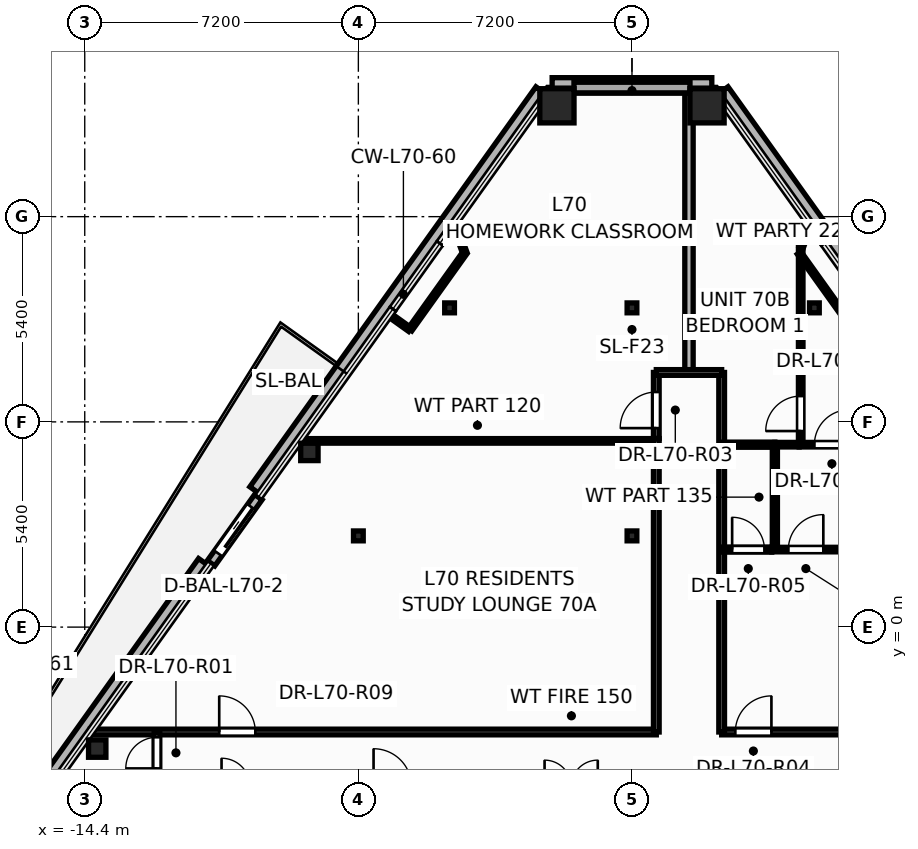
"""IFC4 building model, lengths in metres.
Left out: names, types, materials, properties, quantities, classifications, styles, units other than length and angle.
Written with IfcOpenShell. Run it as: python <this file> out.ifc"""

import sys

from ifc_helpers import new_model, si_unit, direction, frame, frame_2d, origin, origin_2d, place, context, subcontext, project, spatial, rectangle, hollow_rectangle, hollow_circle, i_section, extrude, element, fill, save


model = new_model("IFC4")
c1 = context("Model", 3, precision=1e-05, world=origin(), true_north=direction((0.0, 1.0)))
c2 = subcontext(c1, "Body", "Model", "MODEL_VIEW")
j1 = project(units=[si_unit("LENGTHUNIT", "METRE"), si_unit("PLANEANGLEUNIT", "RADIAN")], contexts=[c1])
p1 = place(None, origin())
s1 = spatial("IfcSite", under=j1, at=p1, CompositionType="ELEMENT")
p2 = place(p1, origin())
s2 = spatial("IfcBuilding", under=s1, at=p2, CompositionType="ELEMENT")
p3 = place(p2, frame((0.0, 0.0, 267.0)))
s3 = spatial("IfcBuildingStorey", under=s2, at=p3, CompositionType="ELEMENT", Elevation=267.0)
for number, where, z_axis, x_axis in (
    (1, (1.975, 13.717, 0.0), (0.0, 0.0, 1.0), (1.0, 0.0, 0.0)),
    (2, (-1.975, 13.717, 0.0), (0.0, 0.0, 1.0), (1.0, 0.0, 0.0)),
):
    element("IfcColumn", number, at=place(p3, frame(where, z_axis=z_axis, x_axis=x_axis)), inside=s3, PredefinedType="COLUMN", context=c2, shape_type="SweptSolid", body=[
        extrude(hollow_rectangle(XDim=0.9, YDim=0.9, WallThickness=0.04, at=origin_2d()), origin(), (0.0, 0.0, 1.0), 3.6),
    ])
for number, where, z_axis, x_axis in (
    (3, (-8.489, 4.61, 0.0), (0.0, 0.0, 1.0), (1.0, 0.0, 0.0)),
    (4, (-14.072, -3.196, 0.0), (0.0, 0.0, 1.0), (1.0, 0.0, 0.0)),
):
    element("IfcColumn", number, at=place(p3, frame(where, z_axis=z_axis, x_axis=x_axis)), inside=s3, PredefinedType="COLUMN", context=c2, shape_type="SweptSolid", body=[
        extrude(hollow_circle(Radius=0.229, WallThickness=0.016, at=origin_2d()), origin(), (0.0, 0.0, 1.0), 3.6),
    ])
for number, where, z_axis, x_axis in (
    (5, (-7.2, 2.4, 0.0), (0.0, 0.0, 1.0), (1.0, 0.0, 0.0)),
    (6, (0.0, 2.4, 0.0), (0.0, 0.0, 1.0), (1.0, 0.0, 0.0)),
    (7, (-4.8, 8.4, 0.0), (0.0, 0.0, 1.0), (1.0, 0.0, 0.0)),
    (8, (0.0, 8.4, 0.0), (0.0, 0.0, 1.0), (1.0, 0.0, 0.0)),
    (9, (4.8, 8.4, 0.0), (0.0, 0.0, 1.0), (1.0, 0.0, 0.0)),
):
    element("IfcColumn", number, at=place(p3, frame(where, z_axis=z_axis, x_axis=x_axis)), inside=s3, PredefinedType="COLUMN", context=c2, shape_type="SweptSolid", body=[
        extrude(i_section(OverallWidth=0.256, OverallDepth=0.26, WebThickness=0.01, FlangeThickness=0.017, at=origin_2d()), origin(), (0.0, 0.0, 1.0), 3.6),
    ])
p4 = place(p3, frame((12.042, 0.604, -0.2), z_axis=(0.0, 0.0, 1.0), x_axis=(-0.581727587341, 0.813383681989, 0.0)))
e10 = element("IfcWall", 10, at=p4, inside=s3, PredefinedType="PARAPET", context=c2, shape_type="SweptSolid", body=[
    extrude(rectangle(XDim=16.607, YDim=0.36, at=frame_2d((8.304, 0.0))), origin(), (0.0, 0.0, 1.0), 0.38),
])
p5 = place(p3, frame((2.101, 14.277, -0.2), z_axis=(0.0, 0.0, 1.0), x_axis=(-1.0, 0.0, 0.0)))
e11 = element("IfcWall", 11, at=p5, inside=s3, PredefinedType="PARAPET", context=c2, shape_type="SweptSolid", body=[
    extrude(rectangle(XDim=4.202, YDim=0.36, at=frame_2d((2.101, 0.0))), origin(), (0.0, 0.0, 1.0), 0.38),
])
p6 = place(p3, frame((-2.381, 14.112, -0.2), z_axis=(0.0, 0.0, 1.0), x_axis=(-0.581734227536, -0.813378932917, 0.0)))
e12 = element("IfcWall", 12, at=p6, inside=s3, PredefinedType="PARAPET", context=c2, shape_type="SweptSolid", body=[
    extrude(rectangle(XDim=12.94, YDim=0.36, at=frame_2d((6.47, 0.0))), origin(), (0.0, 0.0, 1.0), 0.38),
])
p7 = place(p3, frame((-11.258, 1.7, -0.2), z_axis=(0.0, 0.0, 1.0), x_axis=(-0.581729036712, -0.813382645405, 0.0)))
e13 = element("IfcWall", 13, at=p7, inside=s3, PredefinedType="PARAPET", context=c2, shape_type="SweptSolid", body=[
    extrude(rectangle(XDim=16.981, YDim=0.36, at=frame_2d((8.491, 0.0))), origin(), (0.0, 0.0, 1.0), 0.38),
])
p8 = place(p3, frame((-9.831, 3.42, -0.015), z_axis=(0.0, 0.0, 1.0), x_axis=(-0.581756116184, -0.81336327756, 0.0)))
e14 = element("IfcWall", 14, at=p8, inside=s3, PredefinedType="STANDARD", context=c2, shape_type="SweptSolid", body=[
    extrude(rectangle(XDim=2.14, YDim=0.24, at=frame_2d((1.07, 0.0))), origin(), (0.0, 0.0, 1.0), 2.878),
])
p9 = place(p8, frame((0.32, 0.0, 0.015)))
e15 = element("IfcOpeningElement", 15, at=p9, cuts=e14, PredefinedType="OPENING", context=c2, shape_type="SweptSolid", body=[
    extrude(rectangle(XDim=1.506, YDim=2.204, at=frame_2d((0.75, 1.102))), frame((0.0, 0.13, 0.0), z_axis=(0.0, -1.0, 0.0), x_axis=(1.0, 0.0, 0.0)), (0.0, 0.0, 1.0), 0.26),
])
p10 = place(p3, frame((-14.251, -2.76, 0.0), z_axis=(0.0, 0.0, 1.0), x_axis=(1.0, 0.0, 0.0)))
e16 = element("IfcWall", 16, at=p10, inside=s3, PredefinedType="PARTITIONING", context=c2, shape_type="SweptSolid", body=[
    extrude(rectangle(XDim=14.891, YDim=0.15, at=frame_2d((7.446, 0.0))), origin(), (0.0, 0.0, 1.0), 2.32),
])
p11 = place(p10, frame((3.39, 0.0, 0.0)))
e17 = element("IfcOpeningElement", 17, at=p11, cuts=e16, PredefinedType="OPENING", context=c2, shape_type="SweptSolid", body=[
    extrude(rectangle(XDim=0.956, YDim=2.104, at=frame_2d((0.475, 1.052))), frame((0.0, 0.085, 0.0), z_axis=(0.0, -1.0, 0.0), x_axis=(1.0, 0.0, 0.0)), (0.0, 0.0, 1.0), 0.17),
])
p12 = place(p3, frame((-8.773, 4.9, 0.0), z_axis=(0.0, 0.0, 1.0), x_axis=(1.0, 0.0, 0.0)))
e18 = element("IfcWall", 18, at=p12, inside=s3, PredefinedType="PARTITIONING", context=c2, shape_type="SweptSolid", body=[
    extrude(rectangle(XDim=9.413, YDim=0.12, at=frame_2d((4.706, 0.0))), origin(), (0.0, 0.0, 1.0), 2.32),
])
p13 = place(p3, frame((0.64, -2.76, 0.0), z_axis=(0.0, 0.0, 1.0), x_axis=(0.0, 1.0, 0.0)))
e19 = element("IfcWall", 19, at=p13, inside=s3, PredefinedType="PARTITIONING", context=c2, shape_type="SweptSolid", body=[
    extrude(rectangle(XDim=7.72, YDim=0.15, at=frame_2d((3.86, 0.0))), origin(), (0.0, 0.0, 1.0), 2.32),
])
p14 = place(p3, frame((1.5, 6.7, 0.0), z_axis=(0.0, 0.0, 1.0), x_axis=(0.0, 1.0, 0.0)))
e20 = element("IfcWall", 20, at=p14, inside=s3, PredefinedType="PARTITIONING", context=c2, shape_type="SweptSolid", body=[
    extrude(rectangle(XDim=7.417, YDim=0.22, at=frame_2d((3.708, 0.0))), origin(), (0.0, 0.0, 1.0), 2.718),
])
p15 = place(p3, frame((4.44, 4.8, 0.0), z_axis=(0.0, 0.0, 1.0), x_axis=(0.0, 1.0, 0.0)))
e21 = element("IfcWall", 21, at=p15, inside=s3, PredefinedType="PARTITIONING", context=c2, shape_type="SweptSolid", body=[
    extrude(rectangle(XDim=5.2, YDim=0.12, at=frame_2d((2.6, 0.0))), origin(), (0.0, 0.0, 1.0), 2.718),
])
p16 = place(p15, frame((0.359, 0.0, 0.0)))
e22 = element("IfcOpeningElement", 22, at=p16, cuts=e21, PredefinedType="OPENING", context=c2, shape_type="SweptSolid", body=[
    extrude(rectangle(XDim=0.926, YDim=2.104, at=frame_2d((0.46, 1.052))), frame((0.0, 0.07, 0.0), z_axis=(0.0, -1.0, 0.0), x_axis=(1.0, 0.0, 0.0)), (0.0, 0.0, 1.0), 0.14),
])
p17 = place(p3, frame((2.36, -2.76, 0.0), z_axis=(0.0, 0.0, 1.0), x_axis=(1.0, 0.0, 0.0)))
e23 = element("IfcWall", 23, at=p17, inside=s3, PredefinedType="PARTITIONING", context=c2, shape_type="SweptSolid", body=[
    extrude(rectangle(XDim=4.978, YDim=0.15, at=frame_2d((2.489, 0.0))), origin(), (0.0, 0.0, 1.0), 2.32),
])
p18 = place(p17, frame((0.359, 0.0, 0.0)))
e24 = element("IfcOpeningElement", 24, at=p18, cuts=e23, PredefinedType="OPENING", context=c2, shape_type="SweptSolid", body=[
    extrude(rectangle(XDim=0.956, YDim=2.104, at=frame_2d((0.475, 1.052))), frame((0.0, 0.085, 0.0), z_axis=(0.0, -1.0, 0.0), x_axis=(1.0, 0.0, 0.0)), (0.0, 0.0, 1.0), 0.17),
])
p19 = place(p3, frame((2.36, -2.76, 0.0), z_axis=(0.0, 0.0, 1.0), x_axis=(0.0, 1.0, 0.0)))
e25 = element("IfcWall", 25, at=p19, inside=s3, PredefinedType="PARTITIONING", context=c2, shape_type="SweptSolid", body=[
    extrude(rectangle(XDim=9.46, YDim=0.15, at=frame_2d((4.73, 0.0))), origin(), (0.0, 0.0, 1.0), 2.32),
])
p20 = place(p3, frame((4.4, 4.8, 0.0), z_axis=(0.0, 0.0, 1.0), x_axis=(1.0, 0.0, 0.0)))
e26 = element("IfcWall", 26, at=p20, inside=s3, PredefinedType="PARTITIONING", context=c2, shape_type="SweptSolid", body=[
    extrude(rectangle(XDim=4.444, YDim=0.12, at=frame_2d((2.222, 0.0))), origin(), (0.0, 0.0, 1.0), 2.718),
])
p21 = place(p20, frame((0.4, 0.0, 0.0)))
e27 = element("IfcOpeningElement", 27, at=p21, cuts=e26, PredefinedType="OPENING", context=c2, shape_type="SweptSolid", body=[
    extrude(rectangle(XDim=0.926, YDim=2.104, at=frame_2d((0.46, 1.052))), frame((0.0, 0.07, 0.0), z_axis=(0.0, -1.0, 0.0), x_axis=(1.0, 0.0, 0.0)), (0.0, 0.0, 1.0), 0.14),
])
p22 = place(p3, frame((3.68, 2.04, 0.0), z_axis=(0.0, 0.0, 1.0), x_axis=(1.0, 0.0, 0.0)))
e28 = element("IfcWall", 28, at=p22, inside=s3, PredefinedType="PARTITIONING", context=c2, shape_type="SweptSolid", body=[
    extrude(rectangle(XDim=3.72, YDim=0.12, at=frame_2d((1.86, 0.0))), origin(), (0.0, 0.0, 1.0), 2.32),
])
p23 = place(p22, frame((0.435, 0.0, 0.0)))
e29 = element("IfcOpeningElement", 29, at=p23, cuts=e28, PredefinedType="OPENING", context=c2, shape_type="SweptSolid", body=[
    extrude(rectangle(XDim=0.926, YDim=2.104, at=frame_2d((0.46, 1.052))), frame((0.0, 0.07, 0.0), z_axis=(0.0, -1.0, 0.0), x_axis=(1.0, 0.0, 0.0)), (0.0, 0.0, 1.0), 0.14),
])
p24 = place(p3, frame((3.76, 2.04, 0.0), z_axis=(0.0, 0.0, 1.0), x_axis=(0.0, 1.0, 0.0)))
e30 = element("IfcWall", 30, at=p24, inside=s3, PredefinedType="PARTITIONING", context=c2, shape_type="SweptSolid", body=[
    extrude(rectangle(XDim=2.76, YDim=0.135, at=frame_2d((1.38, 0.0))), origin(), (0.0, 0.0, 1.0), 2.32),
])
for number, where, z_axis, x_axis in (
    (31, (-4.399, 9.846, 0.0), (0.0, 0.0, 1.0), (-0.582, -0.813, 0.0)),
    (32, (5.842, 7.829, 0.0), (0.0, 0.0, 1.0), (-0.582, 0.813, 0.0)),
):
    element("IfcWall", number, at=place(p3, frame(where, z_axis=z_axis, x_axis=x_axis)), inside=s3, PredefinedType="PARTITIONING", context=c2, shape_type="SweptSolid", body=[
        extrude(rectangle(XDim=2.48, YDim=0.12, at=frame_2d((1.24, 0.0))), origin(), (0.0, 0.0, 1.0), 3.345),
    ])
p25 = place(p3, frame((0.64, 4.962, 0.0), z_axis=(0.0, 0.0, 1.0), x_axis=(0.0, 1.0, 0.0)))
e33 = element("IfcWall", 33, at=p25, inside=s3, PredefinedType="PARTITIONING", context=c2, shape_type="SweptSolid", body=[
    extrude(rectangle(XDim=1.738, YDim=0.15, at=frame_2d((0.869, 0.0))), origin(), (0.0, 0.0, 1.0), 3.345),
])
p26 = place(p25, frame((0.274, 0.0, 0.0)))
e34 = element("IfcOpeningElement", 34, at=p26, cuts=e33, PredefinedType="OPENING", context=c2, shape_type="SweptSolid", body=[
    extrude(rectangle(XDim=0.956, YDim=2.104, at=frame_2d((0.475, 1.052))), frame((0.0, 0.085, 0.0), z_axis=(0.0, -1.0, 0.0), x_axis=(1.0, 0.0, 0.0)), (0.0, 0.0, 1.0), 0.17),
])
p27 = place(p3, frame((-12.5, -4.24, 0.0), z_axis=(0.0, 0.0, 1.0), x_axis=(0.0, 1.0, 0.0)))
e35 = element("IfcWall", 35, at=p27, inside=s3, PredefinedType="PARTITIONING", context=c2, shape_type="SweptSolid", body=[
    extrude(rectangle(XDim=1.48, YDim=0.15, at=frame_2d((0.74, 0.0))), origin(), (0.0, 0.0, 1.0), 2.32),
])
p28 = place(p27, frame((0.522, 0.0, 0.0)))
e36 = element("IfcOpeningElement", 36, at=p28, cuts=e35, PredefinedType="OPENING", context=c2, shape_type="SweptSolid", body=[
    extrude(rectangle(XDim=0.826, YDim=2.104, at=frame_2d((0.41, 1.052))), frame((0.0, 0.085, 0.0), z_axis=(0.0, -1.0, 0.0), x_axis=(1.0, 0.0, 0.0)), (0.0, 0.0, 1.0), 0.17),
])
p29 = place(p3, frame((2.36, 2.04, 0.0), z_axis=(0.0, 0.0, 1.0), x_axis=(1.0, 0.0, 0.0)))
e37 = element("IfcWall", 37, at=p29, inside=s3, PredefinedType="PARTITIONING", context=c2, shape_type="SweptSolid", body=[
    extrude(rectangle(XDim=1.318, YDim=0.135, at=frame_2d((0.659, 0.0))), origin(), (0.0, 0.0, 1.0), 2.964),
])
p30 = place(p29, frame((0.276, 0.0, 0.0)))
e38 = element("IfcOpeningElement", 38, at=p30, cuts=e37, PredefinedType="OPENING", context=c2, shape_type="SweptSolid", body=[
    extrude(rectangle(XDim=0.856, YDim=2.104, at=frame_2d((0.425, 1.052))), frame((0.0, 0.078, 0.0), z_axis=(0.0, -1.0, 0.0), x_axis=(1.0, 0.0, 0.0)), (0.0, 0.0, 1.0), 0.155),
])
p31 = place(p3, frame((2.36, 4.8, 0.0), z_axis=(0.0, 0.0, 1.0), x_axis=(1.0, 0.0, 0.0)))
e39 = element("IfcWall", 39, at=p31, inside=s3, PredefinedType="PARTITIONING", context=c2, shape_type="SweptSolid", body=[
    extrude(rectangle(XDim=1.4, YDim=0.135, at=frame_2d((0.7, 0.0))), origin(), (0.0, 0.0, 1.0), 2.964),
])
p32 = place(p3, frame((0.64, 6.7, 0.0), z_axis=(0.0, 0.0, 1.0), x_axis=(1.0, 0.0, 0.0)))
e40 = element("IfcWall", 40, at=p32, inside=s3, PredefinedType="PARTITIONING", context=c2, shape_type="SweptSolid", body=[
    extrude(rectangle(XDim=1.72, YDim=0.15, at=frame_2d((0.86, 0.0))), origin(), (0.0, 0.0, 1.0), 2.964),
])
p33 = place(p3, frame((-4.675, 10.612, 0.0), z_axis=(0.0, 0.0, 1.0), x_axis=(0.338177982942, -0.941082170617, 0.0)))
e41 = element("IfcWall", 41, at=p33, inside=s3, PredefinedType="PARTITIONING", context=c2, shape_type="SweptSolid", body=[
    extrude(rectangle(XDim=0.814, YDim=0.12, at=frame_2d((0.407, 0.0))), origin(), (0.0, 0.0, 1.0), 2.863),
])
p34 = place(p3, frame((4.455, 10.002, 0.0), z_axis=(0.0, 0.0, 1.0), x_axis=(0.338386229144, 0.941007311303, 0.0)))
e42 = element("IfcWall", 42, at=p34, inside=s3, PredefinedType="PARTITIONING", context=c2, shape_type="SweptSolid", body=[
    extrude(rectangle(XDim=0.649, YDim=0.12, at=frame_2d((0.324, 0.0))), origin(), (0.0, 0.0, 1.0), 2.863),
])
p35 = place(p3, frame((3.76, 4.8, 0.0), z_axis=(0.0, 0.0, 1.0), x_axis=(1.0, 0.0, 0.0)))
e43 = element("IfcWall", 43, at=p35, inside=s3, PredefinedType="PARTITIONING", context=c2, shape_type="SweptSolid", body=[
    extrude(rectangle(XDim=0.638, YDim=0.12, at=frame_2d((0.319, 0.0))), origin(), (0.0, 0.0, 1.0), 3.345),
])
p36 = place(p3, frame((-5.842, 7.829, 0.0), z_axis=(0.0, 0.0, 1.0), x_axis=(-0.813265440227, 0.581892879947, 0.0)))
e44 = element("IfcWall", 44, at=p36, inside=s3, PredefinedType="PARTITIONING", context=c2, shape_type="SweptSolid", body=[
    extrude(rectangle(XDim=0.67, YDim=0.12, at=frame_2d((0.335, 0.0))), origin(), (0.0, 0.0, 1.0), 2.863),
])
p37 = place(p9, origin())
e45 = element("IfcDoor", 45, at=p37, inside=s3, OperationType="SLIDING_TO_RIGHT", PredefinedType="DOOR", context=c2, shape_type="SweptSolid", body=[
    extrude(rectangle(XDim=1.5, YDim=2.2, at=frame_2d((0.75, 1.1))), frame((0.0, 0.025, 0.0), z_axis=(0.0, -1.0, 0.0), x_axis=(1.0, 0.0, 0.0)), (0.0, 0.0, 1.0), 0.05),
])
fill(e15, e45)
p38 = place(p28, origin())
e46 = element("IfcDoor", 46, at=p38, inside=s3, OperationType="SINGLE_SWING_LEFT", PredefinedType="DOOR", context=c2, shape_type="SweptSolid", body=[
    extrude(rectangle(XDim=0.82, YDim=2.1, at=frame_2d((0.41, 1.05))), frame((0.0, 0.025, 0.0), z_axis=(0.0, -1.0, 0.0), x_axis=(1.0, 0.0, 0.0)), (0.0, 0.0, 1.0), 0.05),
])
fill(e36, e46)
p39 = place(p26, origin())
e47 = element("IfcDoor", 47, at=p39, inside=s3, OperationType="SINGLE_SWING_LEFT", PredefinedType="DOOR", context=c2, shape_type="SweptSolid", body=[
    extrude(rectangle(XDim=0.95, YDim=2.1, at=frame_2d((0.475, 1.05))), frame((0.0, 0.025, 0.0), z_axis=(0.0, -1.0, 0.0), x_axis=(1.0, 0.0, 0.0)), (0.0, 0.0, 1.0), 0.05),
])
fill(e34, e47)
p40 = place(p18, origin())
e48 = element("IfcDoor", 48, at=p40, inside=s3, OperationType="SINGLE_SWING_RIGHT", PredefinedType="DOOR", context=c2, shape_type="SweptSolid", body=[
    extrude(rectangle(XDim=0.95, YDim=2.1, at=frame_2d((0.475, 1.05))), frame((0.0, 0.025, 0.0), z_axis=(0.0, -1.0, 0.0), x_axis=(1.0, 0.0, 0.0)), (0.0, 0.0, 1.0), 0.05),
])
fill(e24, e48)
p41 = place(p30, origin())
e49 = element("IfcDoor", 49, at=p41, inside=s3, OperationType="SINGLE_SWING_LEFT", PredefinedType="DOOR", context=c2, shape_type="SweptSolid", body=[
    extrude(rectangle(XDim=0.85, YDim=2.1, at=frame_2d((0.425, 1.05))), frame((0.0, 0.025, 0.0), z_axis=(0.0, -1.0, 0.0), x_axis=(1.0, 0.0, 0.0)), (0.0, 0.0, 1.0), 0.05),
])
fill(e38, e49)
p42 = place(p23, origin())
e50 = element("IfcDoor", 50, at=p42, inside=s3, OperationType="SINGLE_SWING_RIGHT", PredefinedType="DOOR", context=c2, shape_type="SweptSolid", body=[
    extrude(rectangle(XDim=0.92, YDim=2.1, at=frame_2d((0.46, 1.05))), frame((0.0, 0.025, 0.0), z_axis=(0.0, -1.0, 0.0), x_axis=(1.0, 0.0, 0.0)), (0.0, 0.0, 1.0), 0.05),
])
fill(e29, e50)
p43 = place(p16, origin())
e51 = element("IfcDoor", 51, at=p43, inside=s3, OperationType="SINGLE_SWING_LEFT", PredefinedType="DOOR", context=c2, shape_type="SweptSolid", body=[
    extrude(rectangle(XDim=0.92, YDim=2.1, at=frame_2d((0.46, 1.05))), frame((0.0, 0.025, 0.0), z_axis=(0.0, -1.0, 0.0), x_axis=(1.0, 0.0, 0.0)), (0.0, 0.0, 1.0), 0.05),
])
fill(e22, e51)
p44 = place(p11, origin())
e52 = element("IfcDoor", 52, at=p44, inside=s3, OperationType="SINGLE_SWING_LEFT", PredefinedType="DOOR", context=c2, shape_type="SweptSolid", body=[
    extrude(rectangle(XDim=0.95, YDim=2.1, at=frame_2d((0.475, 1.05))), frame((0.0, 0.025, 0.0), z_axis=(0.0, -1.0, 0.0), x_axis=(1.0, 0.0, 0.0)), (0.0, 0.0, 1.0), 0.05),
])
fill(e17, e52)
p45 = place(p21, origin())
e53 = element("IfcDoor", 53, at=p45, inside=s3, OperationType="SINGLE_SWING_RIGHT", PredefinedType="DOOR", context=c2, shape_type="SweptSolid", body=[
    extrude(rectangle(XDim=0.92, YDim=2.1, at=frame_2d((0.46, 1.05))), frame((0.0, 0.025, 0.0), z_axis=(0.0, -1.0, 0.0), x_axis=(1.0, 0.0, 0.0)), (0.0, 0.0, 1.0), 0.05),
])
fill(e27, e53)
save(model, sys.argv[1])
